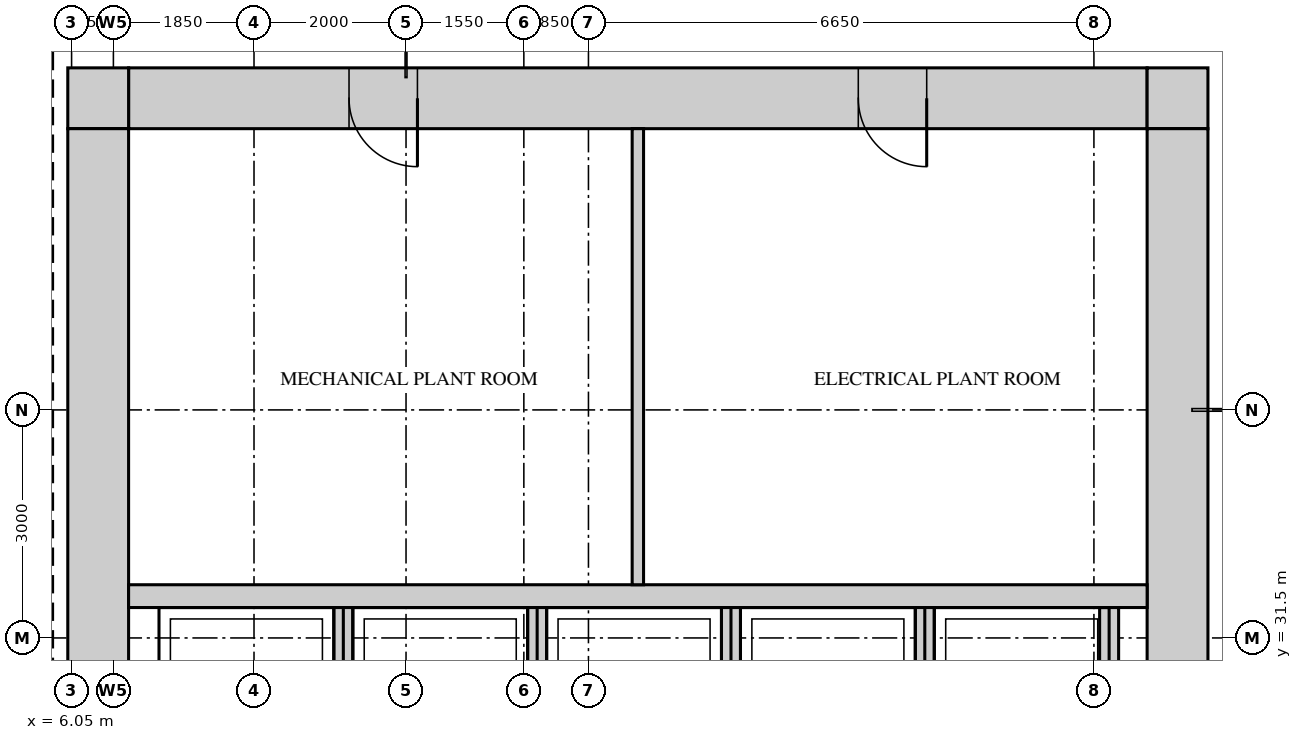
"""IFC4 building model, lengths in metres.
Left out: names, types, materials, properties, quantities, classifications, styles, units other than length and angle.
Written with IfcOpenShell. Run it as: python <this file> out.ifc"""

import sys

from ifc_helpers import new_model, si_unit, direction, frame, frame_2d, origin, place, context, subcontext, project, spatial, rectangle, extrude, source, transform, mapped, element, fill, save


model = new_model("IFC4")
c1 = context("Model", 3, precision=1e-05, world=origin(), true_north=direction((0.0, 1.0)))
c2 = subcontext(c1, "Body", "Model", "MODEL_VIEW")
j1 = project(units=[si_unit("LENGTHUNIT", "METRE"), si_unit("PLANEANGLEUNIT", "RADIAN")], contexts=[c1])
p1 = place(None, origin())
s1 = spatial("IfcSite", under=j1, at=p1, CompositionType="ELEMENT")
p2 = place(p1, origin())
s2 = spatial("IfcBuilding", under=s1, at=p2, CompositionType="ELEMENT")
p3 = place(p2, frame((0.0, 0.0, 216.7)))
s3 = spatial("IfcBuildingStorey", under=s2, at=p3, CompositionType="ELEMENT", Elevation=216.7)
m1 = source(origin(), c2, "Body", "SweptSolid", [
    extrude(rectangle(XDim=13.4, YDim=0.8, at=frame_2d((6.7, 0.0))), origin(), (0.0, 0.0, 1.0), 5.25),
])
p4 = place(p3, frame((6.8, 38.6, 0.0), z_axis=(0.0, 0.0, 1.0), x_axis=(1.0, 0.0, 0.0)))
e1 = element("IfcWall", 1, at=p4, inside=s3, PredefinedType="SHEAR", context=c2, shape_type="MappedRepresentation", body=[
    mapped(m1, transform((0.0, 0.0, 0.0))),
])
m2 = source(origin(), c2, "Body", "SweptSolid", [
    extrude(rectangle(XDim=0.9, YDim=2.1, at=frame_2d((0.45, 1.05))), frame((0.0, 0.41, 0.0), z_axis=(0.0, -1.0, 0.0), x_axis=(1.0, 0.0, 0.0)), (0.0, 0.0, 1.0), 0.82),
])
p5 = place(p4, frame((2.9, 0.0, 0.0)))
e2 = element("IfcOpeningElement", 2, at=p5, cuts=e1, PredefinedType="OPENING", context=c2, shape_type="MappedRepresentation", body=[
    mapped(m2, transform((0.0, 0.0, 0.0))),
])
p6 = place(p4, frame((9.6, 0.0, 0.0)))
e3 = element("IfcOpeningElement", 3, at=p6, cuts=e1, PredefinedType="OPENING", context=c2, shape_type="MappedRepresentation", body=[
    mapped(m2, transform((0.0, 0.0, 0.0))),
])
m3 = source(origin(), c2, "Body", "SweptSolid", [
    extrude(rectangle(XDim=0.8, YDim=0.8, at=frame_2d((0.4, 0.0))), origin(), (0.0, 0.0, 1.0), 5.25),
])
for number, where, z_axis, x_axis in (
    (4, (20.2, 38.6, 0.0), (0.0, 0.0, 1.0), (1.0, 0.0, 0.0)),
    (5, (6.0, 38.6, 0.0), (0.0, 0.0, 1.0), (1.0, 0.0, 0.0)),
):
    element("IfcWall", number, at=place(p3, frame(where, z_axis=z_axis, x_axis=x_axis)), inside=s3, PredefinedType="SHEAR", context=c2, shape_type="MappedRepresentation", body=[
        mapped(m3, transform((0.0, 0.0, 0.0))),
    ])
m4 = source(origin(), c2, "Body", "SweptSolid", [
    extrude(rectangle(XDim=22.4, YDim=0.8, at=frame_2d((11.2, 0.0))), origin(), (0.0, 0.0, 1.0), 5.25),
])
p7 = place(p3, frame((20.6, 15.8, 0.0), z_axis=(0.0, 0.0, 1.0), x_axis=(0.0, 1.0, 0.0)))
e6 = element("IfcWall", 6, at=p7, inside=s3, PredefinedType="SHEAR", context=c2, shape_type="MappedRepresentation", body=[
    mapped(m4, transform((0.0, 0.0, 0.0))),
])
m5 = source(origin(), c2, "Body", "SweptSolid", [
    extrude(rectangle(XDim=1.8, YDim=2.1, at=frame_2d((0.9, 1.05))), frame((0.0, 0.41, 0.0), z_axis=(0.0, -1.0, 0.0), x_axis=(1.0, 0.0, 0.0)), (0.0, 0.0, 1.0), 0.82),
])
p8 = place(p7, frame((10.7, 0.0, 0.0)))
e7 = element("IfcOpeningElement", 7, at=p8, cuts=e6, PredefinedType="OPENING", context=c2, shape_type="MappedRepresentation", body=[
    mapped(m5, transform((0.0, 0.0, 0.0))),
])
p9 = place(p7, frame((1.35, 0.0, 0.0)))
e8 = element("IfcOpeningElement", 8, at=p9, cuts=e6, PredefinedType="OPENING", context=c2, shape_type="MappedRepresentation", body=[
    mapped(m2, transform((0.0, 0.0, 0.0))),
])
p10 = place(p7, frame((4.9, 0.0, 0.0)))
e9 = element("IfcOpeningElement", 9, at=p10, cuts=e6, PredefinedType="OPENING", context=c2, shape_type="MappedRepresentation", body=[
    mapped(m2, transform((0.0, 0.0, 0.0))),
])
p11 = place(p3, frame((6.4, 15.8, 0.0), z_axis=(0.0, 0.0, 1.0), x_axis=(0.0, 1.0, 0.0)))
e10 = element("IfcWall", 10, at=p11, inside=s3, PredefinedType="SHEAR", context=c2, shape_type="MappedRepresentation", body=[
    mapped(m4, transform((0.0, 0.0, 0.0))),
])
m6 = source(origin(), c2, "Body", "SweptSolid", [
    extrude(rectangle(XDim=13.4, YDim=0.3, at=frame_2d((6.7, 0.0))), origin(), (0.0, 0.0, 1.0), 5.25),
])
p12 = place(p3, frame((6.8, 32.05, 0.0), z_axis=(0.0, 0.0, 1.0), x_axis=(1.0, 0.0, 0.0)))
e11 = element("IfcWall", 11, at=p12, inside=s3, PredefinedType="STANDARD", context=c2, shape_type="MappedRepresentation", body=[
    mapped(m6, transform((0.0, 0.0, 0.0))),
])
m7 = source(origin(), c2, "Body", "SweptSolid", [
    extrude(rectangle(XDim=2.4, YDim=0.25, at=frame_2d((1.2, 0.0))), origin(), (0.0, 0.0, 1.0), 5.25),
])
for number, where, z_axis, x_axis in (
    (12, (17.275, 29.5, 0.0), (0.0, 0.0, 1.0), (0.0, 1.0, 0.0)),
    (13, (19.7, 29.5, 0.0), (0.0, 0.0, 1.0), (0.0, 1.0, 0.0)),
    (14, (9.625, 29.5, 0.0), (0.0, 0.0, 1.0), (0.0, 1.0, 0.0)),
    (15, (12.175, 29.5, 0.0), (0.0, 0.0, 1.0), (0.0, 1.0, 0.0)),
    (16, (14.725, 29.5, 0.0), (0.0, 0.0, 1.0), (0.0, 1.0, 0.0)),
):
    element("IfcWall", number, at=place(p3, frame(where, z_axis=z_axis, x_axis=x_axis)), inside=s3, PredefinedType="STANDARD", context=c2, shape_type="MappedRepresentation", body=[
        mapped(m7, transform((0.0, 0.0, 0.0))),
    ])
m8 = source(origin(), c2, "Body", "SweptSolid", [
    extrude(rectangle(XDim=6.0, YDim=0.15, at=frame_2d((3.0, 0.0))), origin(), (0.0, 0.0, 1.0), 5.25),
])
p13 = place(p3, frame((13.5, 32.2, 0.0), z_axis=(0.0, 0.0, 1.0), x_axis=(0.0, 1.0, 0.0)))
e17 = element("IfcWall", 17, at=p13, inside=s3, PredefinedType="PARTITIONING", context=c2, shape_type="MappedRepresentation", body=[
    mapped(m8, transform((0.0, 0.0, 0.0))),
])
m9 = source(origin(), c2, "Body", "SweptSolid", [
    extrude(rectangle(XDim=0.9, YDim=2.1, at=frame_2d((0.45, 1.05))), frame((0.0, 0.35, 0.0), z_axis=(0.0, -1.0, 0.0), x_axis=(1.0, 0.0, 0.0)), (0.0, 0.0, 1.0), 0.7),
])
p14 = place(p5, origin())
e18 = element("IfcDoor", 18, at=p14, inside=s3, OperationType="SINGLE_SWING_RIGHT", PredefinedType="DOOR", context=c2, shape_type="MappedRepresentation", body=[
    mapped(m9, transform((0.0, 0.0, 0.0))),
])
fill(e2, e18)
p15 = place(p6, origin())
e19 = element("IfcDoor", 19, at=p15, inside=s3, OperationType="SINGLE_SWING_RIGHT", PredefinedType="DOOR", context=c2, shape_type="MappedRepresentation", body=[
    mapped(m9, transform((0.0, 0.0, 0.0))),
])
fill(e3, e19)
save(model, sys.argv[1])
